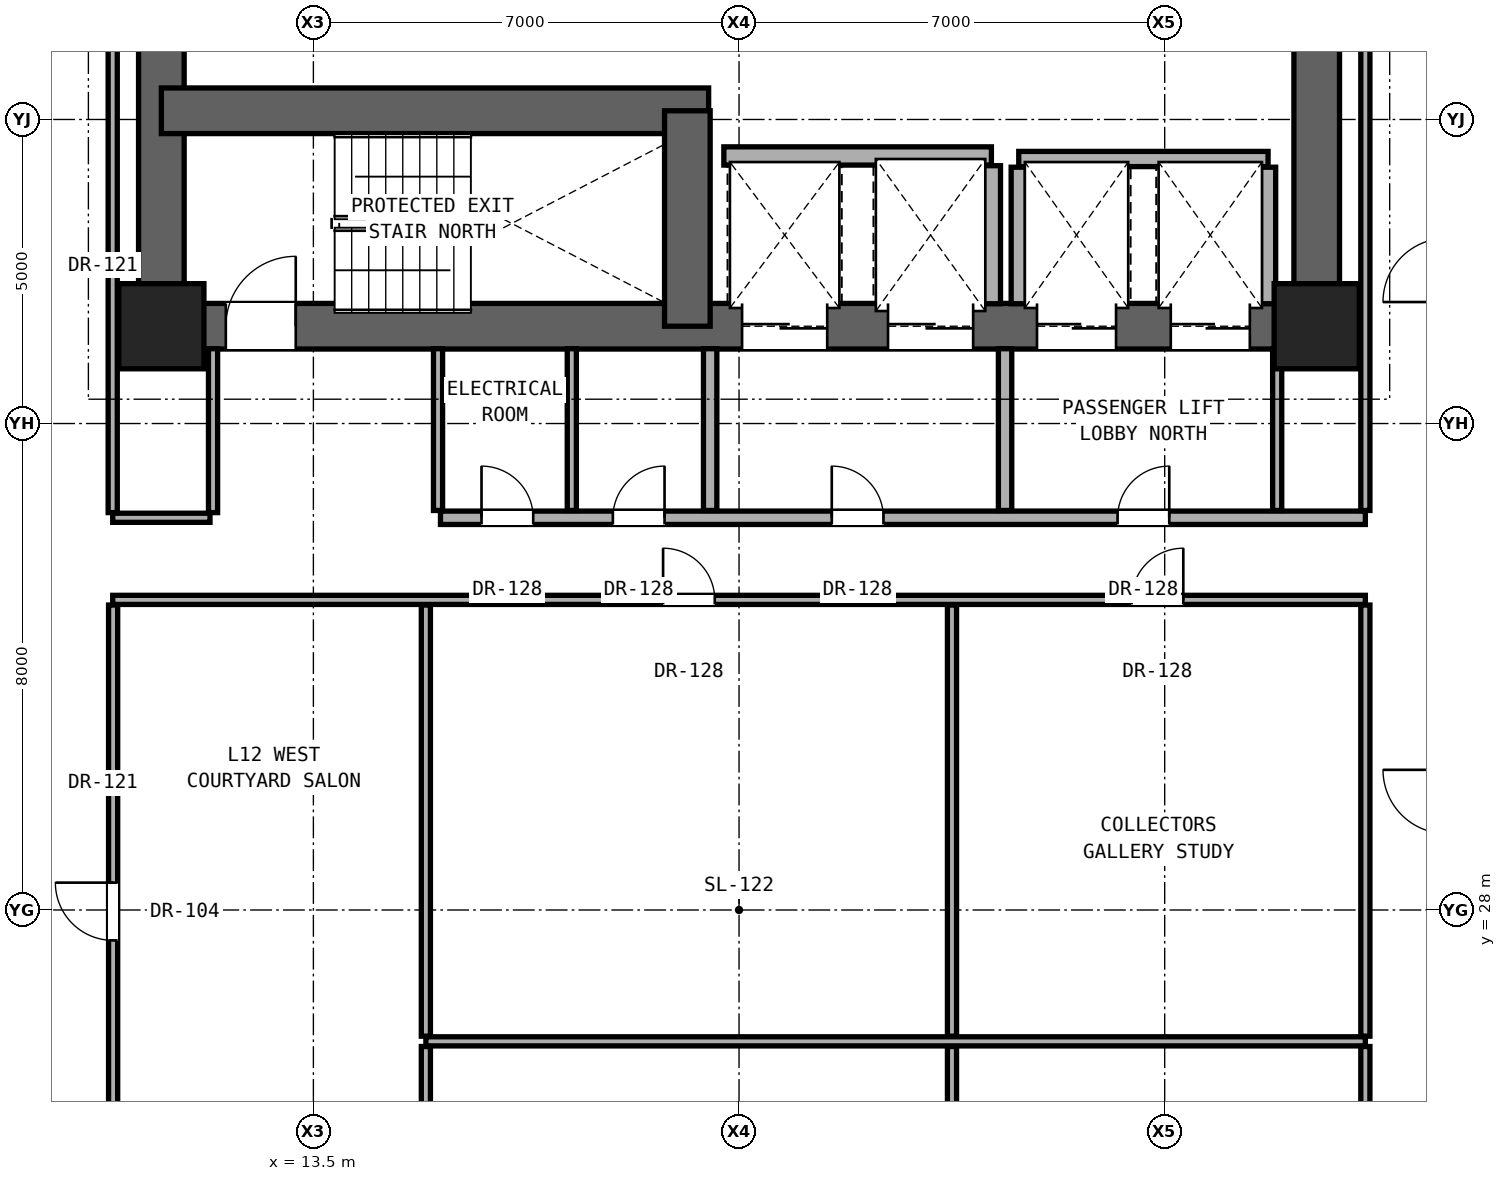
"""IFC4 building model, lengths in metres.
Left out: names, types, materials, properties, quantities, classifications, styles, units other than length and angle.
Written with IfcOpenShell. Run it as: python <this file> out.ifc"""

import sys

from ifc_helpers import new_model, si_unit, direction, frame, frame_2d, origin, origin_2d, place, context, subcontext, project, spatial, rectangle, extrude, element, fill, save


model = new_model("IFC4")
c1 = context("Model", 3, precision=1e-05, world=origin(), true_north=direction((0.0, 1.0)))
c2 = subcontext(c1, "Body", "Model", "MODEL_VIEW")
j1 = project(units=[si_unit("LENGTHUNIT", "METRE"), si_unit("PLANEANGLEUNIT", "RADIAN")], contexts=[c1])
p1 = place(None, origin())
s1 = spatial("IfcSite", under=j1, at=p1, CompositionType="ELEMENT")
p2 = place(p1, origin())
s2 = spatial("IfcBuilding", under=s1, at=p2, CompositionType="ELEMENT")
p3 = place(p2, frame((0.0, 0.0, 45.5)))
s3 = spatial("IfcBuildingStorey", under=s2, at=p3, CompositionType="ELEMENT", Elevation=45.5)
for number, where, z_axis, x_axis in (
    (1, (11.0, 37.6, 0.0), (0.0, 0.0, 1.0), (1.0, 0.0, 0.0)),
    (2, (30.0, 37.6, 0.0), (0.0, 0.0, 1.0), (1.0, 0.0, 0.0)),
):
    element("IfcColumn", number, at=place(p3, frame(where, z_axis=z_axis, x_axis=x_axis)), inside=s3, PredefinedType="COLUMN", context=c2, shape_type="SweptSolid", body=[
        extrude(rectangle(XDim=1.4, YDim=1.4, at=origin_2d()), origin(), (0.0, 0.0, 1.0), 3.3),
    ])
for number, where, z_axis, x_axis in (
    (3, (11.0, 37.6, 0.0), (0.0, 0.0, 1.0), (0.0, 1.0, 0.0)),
    (4, (30.0, 37.6, 0.0), (0.0, 0.0, 1.0), (0.0, 1.0, 0.0)),
):
    element("IfcWall", number, at=place(p3, frame(where, z_axis=z_axis, x_axis=x_axis)), inside=s3, PredefinedType="SHEAR", context=c2, shape_type="SweptSolid", body=[
        extrude(rectangle(XDim=6.0, YDim=0.75, at=frame_2d((3.0, 0.0))), origin(), (0.0, 0.0, 1.0), 3.06),
    ])
p4 = place(p3, frame((11.0, 37.6, 0.0), z_axis=(0.0, 0.0, 1.0), x_axis=(1.0, 0.0, 0.0)))
e5 = element("IfcWall", 5, at=p4, inside=s3, PredefinedType="SHEAR", context=c2, shape_type="SweptSolid", body=[
    extrude(rectangle(XDim=19.0, YDim=0.75, at=frame_2d((9.5, 0.0))), origin(), (0.0, 0.0, 1.0), 3.06),
])
p5 = place(p4, frame((1.06, 0.0, 0.0)))
e6 = element("IfcOpeningElement", 6, at=p5, cuts=e5, PredefinedType="OPENING", context=c2, shape_type="SweptSolid", body=[
    extrude(rectangle(XDim=1.15, YDim=2.2, at=frame_2d((0.575, 1.1))), frame((0.0, 0.385, 0.0), z_axis=(0.0, -1.0, 0.0), x_axis=(1.0, 0.0, 0.0)), (0.0, 0.0, 1.0), 0.77),
])
p6 = place(p4, frame((9.55, 0.0, 0.0)))
e7 = element("IfcOpeningElement", 7, at=p6, cuts=e5, PredefinedType="OPENING", context=c2, shape_type="SweptSolid", body=[
    extrude(rectangle(XDim=1.4, YDim=2.35, at=frame_2d((0.7, 1.175))), frame((0.0, 0.385, 0.0), z_axis=(0.0, -1.0, 0.0), x_axis=(1.0, 0.0, 0.0)), (0.0, 0.0, 1.0), 0.77),
])
p7 = place(p4, frame((11.95, 0.0, 0.0)))
e8 = element("IfcOpeningElement", 8, at=p7, cuts=e5, PredefinedType="OPENING", context=c2, shape_type="SweptSolid", body=[
    extrude(rectangle(XDim=1.4, YDim=2.35, at=frame_2d((0.7, 1.175))), frame((0.0, 0.385, 0.0), z_axis=(0.0, -1.0, 0.0), x_axis=(1.0, 0.0, 0.0)), (0.0, 0.0, 1.0), 0.77),
])
p8 = place(p4, frame((14.4, 0.0, 0.0)))
e9 = element("IfcOpeningElement", 9, at=p8, cuts=e5, PredefinedType="OPENING", context=c2, shape_type="SweptSolid", body=[
    extrude(rectangle(XDim=1.3, YDim=2.3, at=frame_2d((0.65, 1.15))), frame((0.0, 0.385, 0.0), z_axis=(0.0, -1.0, 0.0), x_axis=(1.0, 0.0, 0.0)), (0.0, 0.0, 1.0), 0.77),
])
p9 = place(p4, frame((16.6, 0.0, 0.0)))
e10 = element("IfcOpeningElement", 10, at=p9, cuts=e5, PredefinedType="OPENING", context=c2, shape_type="SweptSolid", body=[
    extrude(rectangle(XDim=1.3, YDim=2.3, at=frame_2d((0.65, 1.15))), frame((0.0, 0.385, 0.0), z_axis=(0.0, -1.0, 0.0), x_axis=(1.0, 0.0, 0.0)), (0.0, 0.0, 1.0), 0.77),
])
p10 = place(p3, frame((11.0, 41.143, 0.0), z_axis=(0.0, 0.0, 1.0), x_axis=(1.0, 0.0, 0.0)))
e11 = element("IfcWall", 11, at=p10, inside=s3, PredefinedType="SHEAR", context=c2, shape_type="SweptSolid", body=[
    extrude(rectangle(XDim=9.0, YDim=0.75, at=frame_2d((4.5, 0.0))), origin(), (0.0, 0.0, 1.0), 3.06),
])
p11 = place(p3, frame((19.65, 37.6, 0.0), z_axis=(0.0, 0.0, 1.0), x_axis=(0.0, 1.0, 0.0)))
e12 = element("IfcWall", 12, at=p11, inside=s3, PredefinedType="SHEAR", context=c2, shape_type="SweptSolid", body=[
    extrude(rectangle(XDim=3.543, YDim=0.75, at=frame_2d((1.771, 0.0))), origin(), (0.0, 0.0, 1.0), 3.06),
])
p12 = place(p3, frame((15.35, 25.84, 0.0), z_axis=(0.0, 0.0, 1.0), x_axis=(1.0, 0.0, 0.0)))
e13 = element("IfcWall", 13, at=p12, inside=s3, PredefinedType="PARTITIONING", context=c2, shape_type="SweptSolid", body=[
    extrude(rectangle(XDim=15.45, YDim=0.15, at=frame_2d((7.725, 0.0))), origin(), (0.0, 0.0, 1.0), 2.104),
])
p13 = place(p3, frame((10.2, 33.1, 0.0), z_axis=(0.0, 0.0, 1.0), x_axis=(1.0, 0.0, 0.0)))
e14 = element("IfcWall", 14, at=p13, inside=s3, PredefinedType="PARTITIONING", context=c2, shape_type="SweptSolid", body=[
    extrude(rectangle(XDim=20.6, YDim=0.15, at=frame_2d((10.3, 0.0))), origin(), (0.0, 0.0, 1.0), 2.104),
])
p14 = place(p13, frame((9.051, 0.0, 0.0)))
e15 = element("IfcOpeningElement", 15, at=p14, cuts=e14, PredefinedType="OPENING", context=c2, shape_type="SweptSolid", body=[
    extrude(rectangle(XDim=0.85, YDim=2.01, at=frame_2d((0.425, 1.005))), frame((0.0, 0.085, 0.0), z_axis=(0.0, -1.0, 0.0), x_axis=(1.0, 0.0, 0.0)), (0.0, 0.0, 1.0), 0.17),
])
p15 = place(p13, frame((16.756, 0.0, 0.0)))
e16 = element("IfcOpeningElement", 16, at=p15, cuts=e14, PredefinedType="OPENING", context=c2, shape_type="SweptSolid", body=[
    extrude(rectangle(XDim=0.85, YDim=2.01, at=frame_2d((0.425, 1.005))), frame((0.0, 0.085, 0.0), z_axis=(0.0, -1.0, 0.0), x_axis=(1.0, 0.0, 0.0)), (0.0, 0.0, 1.0), 0.17),
])
p16 = place(p3, frame((10.2, 34.45, 0.0), z_axis=(0.0, 0.0, 1.0), x_axis=(1.0, 0.0, 0.0)))
e17 = element("IfcWall", 17, at=p16, inside=s3, PredefinedType="PARTITIONING", context=c2, shape_type="SweptSolid", body=[
    extrude(rectangle(XDim=1.6, YDim=0.15, at=frame_2d((0.8, 0.0))), origin(), (0.0, 0.0, 1.0), 2.104),
])
p17 = place(p3, frame((15.59, 34.45, 0.0), z_axis=(0.0, 0.0, 1.0), x_axis=(1.0, 0.0, 0.0)))
e18 = element("IfcWall", 18, at=p17, inside=s3, PredefinedType="SOLIDWALL", context=c2, shape_type="SweptSolid", body=[
    extrude(rectangle(XDim=15.21, YDim=0.22, at=frame_2d((7.605, 0.0))), origin(), (0.0, 0.0, 1.0), 2.104),
])
p18 = place(p17, frame((6.435, 0.0, 0.0)))
e19 = element("IfcOpeningElement", 19, at=p18, cuts=e18, PredefinedType="OPENING", context=c2, shape_type="SweptSolid", body=[
    extrude(rectangle(XDim=0.85, YDim=2.01, at=frame_2d((0.425, 1.005))), frame((0.0, 0.12, 0.0), z_axis=(0.0, -1.0, 0.0), x_axis=(1.0, 0.0, 0.0)), (0.0, 0.0, 1.0), 0.24),
])
p19 = place(p17, frame((11.135, 0.0, 0.0)))
e20 = element("IfcOpeningElement", 20, at=p19, cuts=e18, PredefinedType="OPENING", context=c2, shape_type="SweptSolid", body=[
    extrude(rectangle(XDim=0.85, YDim=2.01, at=frame_2d((0.425, 1.005))), frame((0.0, 0.12, 0.0), z_axis=(0.0, -1.0, 0.0), x_axis=(1.0, 0.0, 0.0)), (0.0, 0.0, 1.0), 0.24),
])
p20 = place(p17, frame((0.675, 0.0, 0.0)))
e21 = element("IfcOpeningElement", 21, at=p20, cuts=e18, PredefinedType="OPENING", context=c2, shape_type="SweptSolid", body=[
    extrude(rectangle(XDim=0.85, YDim=2.01, at=frame_2d((0.425, 1.005))), frame((0.0, 0.12, 0.0), z_axis=(0.0, -1.0, 0.0), x_axis=(1.0, 0.0, 0.0)), (0.0, 0.0, 1.0), 0.24),
])
p21 = place(p17, frame((2.835, 0.0, 0.0)))
e22 = element("IfcOpeningElement", 22, at=p21, cuts=e18, PredefinedType="OPENING", context=c2, shape_type="SweptSolid", body=[
    extrude(rectangle(XDim=0.85, YDim=2.01, at=frame_2d((0.425, 1.005))), frame((0.0, 0.12, 0.0), z_axis=(0.0, -1.0, 0.0), x_axis=(1.0, 0.0, 0.0)), (0.0, 0.0, 1.0), 0.24),
])
p22 = place(p3, frame((25.1, 40.35, 0.0), z_axis=(0.0, 0.0, 1.0), x_axis=(1.0, 0.0, 0.0)))
e23 = element("IfcWall", 23, at=p22, inside=s3, PredefinedType="SOLIDWALL", context=c2, shape_type="SweptSolid", body=[
    extrude(rectangle(XDim=4.1, YDim=0.25, at=frame_2d((2.05, 0.0))), origin(), (0.0, 0.0, 1.0), 3.06),
])
p23 = place(p3, frame((20.25, 40.4, 0.0), z_axis=(0.0, 0.0, 1.0), x_axis=(1.0, 0.0, 0.0)))
e24 = element("IfcWall", 24, at=p23, inside=s3, PredefinedType="SOLIDWALL", context=c2, shape_type="SweptSolid", body=[
    extrude(rectangle(XDim=4.4, YDim=0.3, at=frame_2d((2.2, 0.0))), origin(), (0.0, 0.0, 1.0), 3.06),
])
p24 = place(p3, frame((10.207, 22.935, 0.0), z_axis=(0.0, 0.0, 1.0), x_axis=(0.0, 1.0, 0.0)))
e25 = element("IfcWall", 25, at=p24, inside=s3, PredefinedType="PARTITIONING", context=c2, shape_type="SweptSolid", body=[
    extrude(rectangle(XDim=10.08, YDim=0.15, at=frame_2d((5.04, 0.0))), origin(), (0.0, 0.0, 1.0), 2.279),
])
p25 = place(p24, frame((4.565, 0.0, 0.0)))
e26 = element("IfcOpeningElement", 26, at=p25, cuts=e25, PredefinedType="OPENING", context=c2, shape_type="SweptSolid", body=[
    extrude(rectangle(XDim=0.95, YDim=2.15, at=frame_2d((0.475, 1.075))), frame((0.0, 0.085, 0.0), z_axis=(0.0, -1.0, 0.0), x_axis=(1.0, 0.0, 0.0)), (0.0, 0.0, 1.0), 0.17),
])
p26 = place(p3, frame((10.2, 34.535, 0.0), z_axis=(0.0, 0.0, 1.0), x_axis=(0.0, 1.0, 0.0)))
e27 = element("IfcWall", 27, at=p26, inside=s3, PredefinedType="PARTITIONING", context=c2, shape_type="SweptSolid", body=[
    extrude(rectangle(XDim=9.13, YDim=0.15, at=frame_2d((4.565, 0.0))), origin(), (0.0, 0.0, 1.0), 2.436),
])
p27 = place(p3, frame((11.85, 34.535, 0.0), z_axis=(0.0, 0.0, 1.0), x_axis=(0.0, 1.0, 0.0)))
e28 = element("IfcWall", 28, at=p27, inside=s3, PredefinedType="PARTITIONING", context=c2, shape_type="SweptSolid", body=[
    extrude(rectangle(XDim=2.695, YDim=0.15, at=frame_2d((1.348, 0.0))), origin(), (0.0, 0.0, 1.0), 3.06),
])
p28 = place(p3, frame((15.35, 22.935, 0.0), z_axis=(0.0, 0.0, 1.0), x_axis=(0.0, 1.0, 0.0)))
e29 = element("IfcWall", 29, at=p28, inside=s3, PredefinedType="PARTITIONING", context=c2, shape_type="SweptSolid", body=[
    extrude(rectangle(XDim=2.82, YDim=0.15, at=frame_2d((1.41, 0.0))), origin(), (0.0, 0.0, 1.0), 2.104),
])
p29 = place(p3, frame((15.35, 25.925, 0.0), z_axis=(0.0, 0.0, 1.0), x_axis=(0.0, 1.0, 0.0)))
e30 = element("IfcWall", 30, at=p29, inside=s3, PredefinedType="PARTITIONING", context=c2, shape_type="SweptSolid", body=[
    extrude(rectangle(XDim=7.09, YDim=0.15, at=frame_2d((3.545, 0.0))), origin(), (0.0, 0.0, 1.0), 2.104),
])
p30 = place(p3, frame((15.55, 34.57, 0.0), z_axis=(0.0, 0.0, 1.0), x_axis=(0.0, 1.0, 0.0)))
e31 = element("IfcWall", 31, at=p30, inside=s3, PredefinedType="PARTITIONING", context=c2, shape_type="SweptSolid", body=[
    extrude(rectangle(XDim=2.66, YDim=0.15, at=frame_2d((1.33, 0.0))), origin(), (0.0, 0.0, 1.0), 2.589),
])
p31 = place(p3, frame((17.75, 34.57, 0.0), z_axis=(0.0, 0.0, 1.0), x_axis=(0.0, 1.0, 0.0)))
e32 = element("IfcWall", 32, at=p31, inside=s3, PredefinedType="PARTITIONING", context=c2, shape_type="SweptSolid", body=[
    extrude(rectangle(XDim=2.66, YDim=0.15, at=frame_2d((1.33, 0.0))), origin(), (0.0, 0.0, 1.0), 3.06),
])
p32 = place(p3, frame((20.025, 34.57, 0.0), z_axis=(0.0, 0.0, 1.0), x_axis=(0.0, 1.0, 0.0)))
e33 = element("IfcWall", 33, at=p32, inside=s3, PredefinedType="SOLIDWALL", context=c2, shape_type="SweptSolid", body=[
    extrude(rectangle(XDim=2.66, YDim=0.22, at=frame_2d((1.33, 0.0))), origin(), (0.0, 0.0, 1.0), 3.06),
])
p33 = place(p3, frame((24.002, 19.985, 0.0), z_axis=(0.0, 0.0, 1.0), x_axis=(0.0, 1.0, 0.0)))
e34 = element("IfcWall", 34, at=p33, inside=s3, PredefinedType="PARTITIONING", context=c2, shape_type="SweptSolid", body=[
    extrude(rectangle(XDim=5.77, YDim=0.15, at=frame_2d((2.885, 0.0))), origin(), (0.0, 0.0, 1.0), 2.104),
])
p34 = place(p3, frame((24.002, 25.925, 0.0), z_axis=(0.0, 0.0, 1.0), x_axis=(0.0, 1.0, 0.0)))
e35 = element("IfcWall", 35, at=p34, inside=s3, PredefinedType="PARTITIONING", context=c2, shape_type="SweptSolid", body=[
    extrude(rectangle(XDim=7.09, YDim=0.15, at=frame_2d((3.545, 0.0))), origin(), (0.0, 0.0, 1.0), 2.104),
])
p35 = place(p3, frame((24.65, 37.97, 0.0), z_axis=(0.0, 0.0, 1.0), x_axis=(0.0, 1.0, 0.0)))
e36 = element("IfcWall", 36, at=p35, inside=s3, PredefinedType="SOLIDWALL", context=c2, shape_type="SweptSolid", body=[
    extrude(rectangle(XDim=2.27, YDim=0.3, at=frame_2d((1.135, 0.0))), origin(), (0.0, 0.0, 1.0), 3.06),
])
p36 = place(p3, frame((24.875, 34.57, 0.0), z_axis=(0.0, 0.0, 1.0), x_axis=(0.0, 1.0, 0.0)))
e37 = element("IfcWall", 37, at=p36, inside=s3, PredefinedType="SOLIDWALL", context=c2, shape_type="SweptSolid", body=[
    extrude(rectangle(XDim=2.66, YDim=0.22, at=frame_2d((1.33, 0.0))), origin(), (0.0, 0.0, 1.0), 3.06),
])
p37 = place(p3, frame((25.1, 37.97, 0.0), z_axis=(0.0, 0.0, 1.0), x_axis=(0.0, 1.0, 0.0)))
e38 = element("IfcWall", 38, at=p37, inside=s3, PredefinedType="SOLIDWALL", context=c2, shape_type="SweptSolid", body=[
    extrude(rectangle(XDim=2.245, YDim=0.25, at=frame_2d((1.123, 0.0))), origin(), (0.0, 0.0, 1.0), 3.06),
])
p38 = place(p3, frame((29.35, 34.57, 0.0), z_axis=(0.0, 0.0, 1.0), x_axis=(0.0, 1.0, 0.0)))
e39 = element("IfcWall", 39, at=p38, inside=s3, PredefinedType="PARTITIONING", context=c2, shape_type="SweptSolid", body=[
    extrude(rectangle(XDim=2.66, YDim=0.15, at=frame_2d((1.33, 0.0))), origin(), (0.0, 0.0, 1.0), 3.06),
])
p39 = place(p3, frame((29.2, 37.97, 0.0), z_axis=(0.0, 0.0, 1.0), x_axis=(0.0, 1.0, 0.0)))
e40 = element("IfcWall", 40, at=p39, inside=s3, PredefinedType="SOLIDWALL", context=c2, shape_type="SweptSolid", body=[
    extrude(rectangle(XDim=2.245, YDim=0.25, at=frame_2d((1.123, 0.0))), origin(), (0.0, 0.0, 1.0), 3.06),
])
p40 = place(p3, frame((30.8, 19.985, 0.0), z_axis=(0.0, 0.0, 1.0), x_axis=(0.0, 1.0, 0.0)))
e41 = element("IfcWall", 41, at=p40, inside=s3, PredefinedType="PARTITIONING", context=c2, shape_type="SweptSolid", body=[
    extrude(rectangle(XDim=5.77, YDim=0.15, at=frame_2d((2.885, 0.0))), origin(), (0.0, 0.0, 1.0), 2.279),
])
p41 = place(p3, frame((30.8, 25.925, 0.0), z_axis=(0.0, 0.0, 1.0), x_axis=(0.0, 1.0, 0.0)))
e42 = element("IfcWall", 42, at=p41, inside=s3, PredefinedType="PARTITIONING", context=c2, shape_type="SweptSolid", body=[
    extrude(rectangle(XDim=7.09, YDim=0.15, at=frame_2d((3.545, 0.0))), origin(), (0.0, 0.0, 1.0), 2.279),
])
p42 = place(p3, frame((30.8, 34.57, 0.0), z_axis=(0.0, 0.0, 1.0), x_axis=(0.0, 1.0, 0.0)))
e43 = element("IfcWall", 43, at=p42, inside=s3, PredefinedType="PARTITIONING", context=c2, shape_type="SweptSolid", body=[
    extrude(rectangle(XDim=9.095, YDim=0.15, at=frame_2d((4.547, 0.0))), origin(), (0.0, 0.0, 1.0), 2.436),
])
p43 = place(p5, origin())
e44 = element("IfcDoor", 44, at=p43, inside=s3, OperationType="SINGLE_SWING_RIGHT", PredefinedType="DOOR", context=c2, shape_type="SweptSolid", body=[
    extrude(rectangle(XDim=1.15, YDim=2.2, at=frame_2d((0.575, 1.1))), frame((0.0, 0.025, 0.0), z_axis=(0.0, -1.0, 0.0), x_axis=(1.0, 0.0, 0.0)), (0.0, 0.0, 1.0), 0.05),
])
fill(e6, e44)
p44 = place(p18, origin())
e45 = element("IfcDoor", 45, at=p44, inside=s3, OperationType="SINGLE_SWING_LEFT", PredefinedType="DOOR", context=c2, shape_type="SweptSolid", body=[
    extrude(rectangle(XDim=0.85, YDim=2.01, at=frame_2d((0.425, 1.005))), frame((0.0, 0.025, 0.0), z_axis=(0.0, -1.0, 0.0), x_axis=(1.0, 0.0, 0.0)), (0.0, 0.0, 1.0), 0.05),
])
fill(e19, e45)
p45 = place(p19, origin())
e46 = element("IfcDoor", 46, at=p45, inside=s3, OperationType="SINGLE_SWING_RIGHT", PredefinedType="DOOR", context=c2, shape_type="SweptSolid", body=[
    extrude(rectangle(XDim=0.85, YDim=2.01, at=frame_2d((0.425, 1.005))), frame((0.0, 0.025, 0.0), z_axis=(0.0, -1.0, 0.0), x_axis=(1.0, 0.0, 0.0)), (0.0, 0.0, 1.0), 0.05),
])
fill(e20, e46)
p46 = place(p20, origin())
e47 = element("IfcDoor", 47, at=p46, inside=s3, OperationType="SINGLE_SWING_LEFT", PredefinedType="DOOR", context=c2, shape_type="SweptSolid", body=[
    extrude(rectangle(XDim=0.85, YDim=2.01, at=frame_2d((0.425, 1.005))), frame((0.0, 0.025, 0.0), z_axis=(0.0, -1.0, 0.0), x_axis=(1.0, 0.0, 0.0)), (0.0, 0.0, 1.0), 0.05),
])
fill(e21, e47)
p47 = place(p21, origin())
e48 = element("IfcDoor", 48, at=p47, inside=s3, OperationType="SINGLE_SWING_RIGHT", PredefinedType="DOOR", context=c2, shape_type="SweptSolid", body=[
    extrude(rectangle(XDim=0.85, YDim=2.01, at=frame_2d((0.425, 1.005))), frame((0.0, 0.025, 0.0), z_axis=(0.0, -1.0, 0.0), x_axis=(1.0, 0.0, 0.0)), (0.0, 0.0, 1.0), 0.05),
])
fill(e22, e48)
p48 = place(p25, origin())
e49 = element("IfcDoor", 49, at=p48, inside=s3, OperationType="SINGLE_SWING_RIGHT", PredefinedType="DOOR", context=c2, shape_type="SweptSolid", body=[
    extrude(rectangle(XDim=0.95, YDim=2.15, at=frame_2d((0.475, 1.075))), frame((0.0, 0.025, 0.0), z_axis=(0.0, -1.0, 0.0), x_axis=(1.0, 0.0, 0.0)), (0.0, 0.0, 1.0), 0.05),
])
fill(e26, e49)
p49 = place(p14, origin())
e50 = element("IfcDoor", 50, at=p49, inside=s3, OperationType="SINGLE_SWING_LEFT", PredefinedType="DOOR", context=c2, shape_type="SweptSolid", body=[
    extrude(rectangle(XDim=0.85, YDim=2.01, at=frame_2d((0.425, 1.005))), frame((0.0, 0.025, 0.0), z_axis=(0.0, -1.0, 0.0), x_axis=(1.0, 0.0, 0.0)), (0.0, 0.0, 1.0), 0.05),
])
fill(e15, e50)
p50 = place(p15, origin())
e51 = element("IfcDoor", 51, at=p50, inside=s3, OperationType="SINGLE_SWING_RIGHT", PredefinedType="DOOR", context=c2, shape_type="SweptSolid", body=[
    extrude(rectangle(XDim=0.85, YDim=2.01, at=frame_2d((0.425, 1.005))), frame((0.0, 0.025, 0.0), z_axis=(0.0, -1.0, 0.0), x_axis=(1.0, 0.0, 0.0)), (0.0, 0.0, 1.0), 0.05),
])
fill(e16, e51)
p51 = place(p6, origin())
e52 = element("IfcDoor", 52, at=p51, inside=s3, OperationType="DOUBLE_DOOR_SLIDING", PredefinedType="DOOR", context=c2, shape_type="SweptSolid", body=[
    extrude(rectangle(XDim=1.4, YDim=2.35, at=frame_2d((0.7, 1.175))), frame((0.0, 0.025, 0.0), z_axis=(0.0, -1.0, 0.0), x_axis=(1.0, 0.0, 0.0)), (0.0, 0.0, 1.0), 0.05),
])
fill(e7, e52)
p52 = place(p7, origin())
e53 = element("IfcDoor", 53, at=p52, inside=s3, OperationType="DOUBLE_DOOR_SLIDING", PredefinedType="DOOR", context=c2, shape_type="SweptSolid", body=[
    extrude(rectangle(XDim=1.4, YDim=2.35, at=frame_2d((0.7, 1.175))), frame((0.0, 0.025, 0.0), z_axis=(0.0, -1.0, 0.0), x_axis=(1.0, 0.0, 0.0)), (0.0, 0.0, 1.0), 0.05),
])
fill(e8, e53)
p53 = place(p8, origin())
e54 = element("IfcDoor", 54, at=p53, inside=s3, OperationType="DOUBLE_DOOR_SLIDING", PredefinedType="DOOR", context=c2, shape_type="SweptSolid", body=[
    extrude(rectangle(XDim=1.3, YDim=2.3, at=frame_2d((0.65, 1.15))), frame((0.0, 0.025, 0.0), z_axis=(0.0, -1.0, 0.0), x_axis=(1.0, 0.0, 0.0)), (0.0, 0.0, 1.0), 0.05),
])
fill(e9, e54)
p54 = place(p9, origin())
e55 = element("IfcDoor", 55, at=p54, inside=s3, OperationType="DOUBLE_DOOR_SLIDING", PredefinedType="DOOR", context=c2, shape_type="SweptSolid", body=[
    extrude(rectangle(XDim=1.3, YDim=2.3, at=frame_2d((0.65, 1.15))), frame((0.0, 0.025, 0.0), z_axis=(0.0, -1.0, 0.0), x_axis=(1.0, 0.0, 0.0)), (0.0, 0.0, 1.0), 0.05),
])
fill(e10, e55)
save(model, sys.argv[1])
